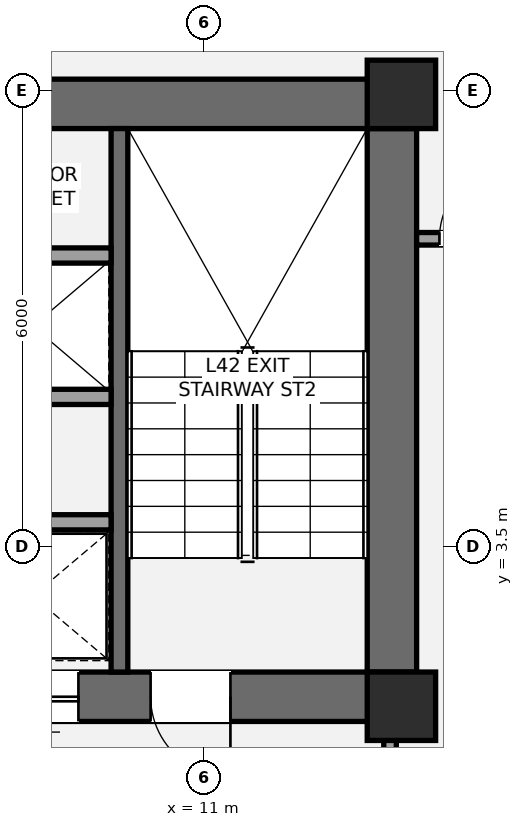
"""IFC4 building model, lengths in metres.
Left out: names, types, materials, properties, quantities, classifications, styles, units other than length and angle.
Written with IfcOpenShell. Run it as: python <this file> out.ifc"""

import sys

from ifc_helpers import new_model, si_unit, direction, frame, frame_2d, origin, origin_2d, place, context, subcontext, project, spatial, rectangle, extrude, element, fill, save


model = new_model("IFC4")
c1 = context("Model", 3, precision=1e-05, world=origin(), true_north=direction((0.0, 1.0)))
c2 = subcontext(c1, "Body", "Model", "MODEL_VIEW")
j1 = project(units=[si_unit("LENGTHUNIT", "METRE"), si_unit("PLANEANGLEUNIT", "RADIAN")], contexts=[c1])
p1 = place(None, origin())
s1 = spatial("IfcSite", under=j1, at=p1, CompositionType="ELEMENT")
p2 = place(p1, origin())
s2 = spatial("IfcBuilding", under=s1, at=p2, CompositionType="ELEMENT")
p3 = place(p2, frame((0.0, 0.0, 156.6)))
s3 = spatial("IfcBuildingStorey", under=s2, at=p3, CompositionType="ELEMENT", Elevation=156.6)
p4 = place(p3, frame((13.475, 1.2, 0.0), z_axis=(0.0, 0.0, 1.0), x_axis=(0.0, 1.0, 0.0)))
e1 = element("IfcWall", 1, at=p4, inside=s3, PredefinedType="SHEAR", context=c2, shape_type="SweptSolid", body=[
    extrude(rectangle(XDim=8.45, YDim=0.65, at=frame_2d((4.225, 0.0))), origin(), (0.0, 0.0, 1.0), 3.2),
])
p5 = place(p3, frame((4.475, 9.325, 0.0), z_axis=(0.0, 0.0, 1.0), x_axis=(1.0, 0.0, 0.0)))
e2 = element("IfcWall", 2, at=p5, inside=s3, PredefinedType="SHEAR", context=c2, shape_type="SweptSolid", body=[
    extrude(rectangle(XDim=9.325, YDim=0.65, at=frame_2d((4.663, 0.0))), origin(), (0.0, 0.0, 1.0), 3.2),
])
p6 = place(p3, frame((13.8, 1.525, 0.0), z_axis=(0.0, 0.0, 1.0), x_axis=(-1.0, 0.0, 0.0)))
e3 = element("IfcWall", 3, at=p6, inside=s3, PredefinedType="SHEAR", context=c2, shape_type="SweptSolid", body=[
    extrude(rectangle(XDim=8.925, YDim=0.65, at=frame_2d((4.462, 0.0))), origin(), (0.0, 0.0, 1.0), 3.2),
])
p7 = place(p6, frame((2.45, 0.0, 0.0)))
e4 = element("IfcOpeningElement", 4, at=p7, cuts=e3, PredefinedType="OPENING", context=c2, shape_type="SweptSolid", body=[
    extrude(rectangle(XDim=1.05, YDim=2.15, at=frame_2d((0.525, 1.075))), frame((0.0, 0.335, 0.0), z_axis=(0.0, -1.0, 0.0), x_axis=(1.0, 0.0, 0.0)), (0.0, 0.0, 1.0), 0.67),
])
p8 = place(p6, frame((4.45, 0.0, 0.0)))
e5 = element("IfcOpeningElement", 5, at=p8, cuts=e3, PredefinedType="OPENING", context=c2, shape_type="SweptSolid", body=[
    extrude(rectangle(XDim=1.1, YDim=2.2, at=frame_2d((0.55, 1.1))), frame((0.0, 0.335, 0.0), z_axis=(0.0, -1.0, 0.0), x_axis=(1.0, 0.0, 0.0)), (0.0, 0.0, 1.0), 0.67),
])
p9 = place(p3, frame((9.89, 1.85, 0.0), z_axis=(0.0, 0.0, 1.0), x_axis=(0.0, 1.0, 0.0)))
e6 = element("IfcWall", 6, at=p9, inside=s3, PredefinedType="SHEAR", context=c2, shape_type="SweptSolid", body=[
    extrude(rectangle(XDim=7.15, YDim=0.22, at=frame_2d((3.575, 0.0))), origin(), (0.0, 0.0, 1.0), 3.2),
])
for number, where, z_axis, x_axis in (
    (7, (13.6, 1.4, 0.0), (0.0, 0.0, 1.0), (1.0, 0.0, 0.0)),
    (8, (13.6, 9.45, 0.0), (0.0, 0.0, 1.0), (1.0, 0.0, 0.0)),
):
    element("IfcColumn", number, at=place(p3, frame(where, z_axis=z_axis, x_axis=x_axis)), inside=s3, PredefinedType="COLUMN", context=c2, shape_type="SweptSolid", body=[
        extrude(rectangle(XDim=0.9, YDim=0.9, at=origin_2d()), origin(), (0.0, 0.0, 1.0), 3.2),
    ])
p10 = place(p3, frame((13.45, -2.15, 0.0), z_axis=(0.0, 0.0, 1.0), x_axis=(0.0, 1.0, 0.0)))
e9 = element("IfcWall", 9, at=p10, inside=s3, PredefinedType="PARTITIONING", context=c2, shape_type="SweptSolid", body=[
    extrude(rectangle(XDim=3.4, YDim=0.165, at=frame_2d((1.7, 0.0))), origin(), (0.0, 0.0, 1.0), 3.02),
])
p11 = place(p10, frame((1.15, 0.0, 0.0)))
e10 = element("IfcOpeningElement", 10, at=p11, cuts=e9, PredefinedType="OPENING", context=c2, shape_type="SweptSolid", body=[
    extrude(rectangle(XDim=1.05, YDim=2.15, at=frame_2d((0.525, 1.075))), frame((0.0, 0.093, 0.0), z_axis=(0.0, -1.0, 0.0), x_axis=(1.0, 0.0, 0.0)), (0.0, 0.0, 1.0), 0.185),
])
p12 = place(p3, frame((5.525, 3.82, 0.0), z_axis=(0.0, 0.0, 1.0), x_axis=(1.0, 0.0, 0.0)))
e11 = element("IfcWall", 11, at=p12, inside=s3, PredefinedType="SOLIDWALL", context=c2, shape_type="SweptSolid", body=[
    extrude(rectangle(XDim=4.255, YDim=0.2, at=frame_2d((2.127, 0.0))), origin(), (0.0, 0.0, 1.0), 3.02),
])
p13 = place(p12, frame((0.65, 0.0, 0.0)))
e12 = element("IfcOpeningElement", 12, at=p13, cuts=e11, PredefinedType="OPENING", context=c2, shape_type="SweptSolid", body=[
    extrude(rectangle(XDim=1.2, YDim=2.2, at=frame_2d((0.6, 1.1))), frame((0.0, 0.11, 0.0), z_axis=(0.0, -1.0, 0.0), x_axis=(1.0, 0.0, 0.0)), (0.0, 0.0, 1.0), 0.22),
])
for number, where, z_axis, x_axis in (
    (13, (5.525, 5.47, 0.0), (0.0, 0.0, 1.0), (1.0, 0.0, 0.0)),
    (14, (5.525, 7.33, 0.0), (0.0, 0.0, 1.0), (1.0, 0.0, 0.0)),
):
    element("IfcWall", number, at=place(p3, frame(where, z_axis=z_axis, x_axis=x_axis)), inside=s3, PredefinedType="SOLIDWALL", context=c2, shape_type="SweptSolid", body=[
        extrude(rectangle(XDim=4.255, YDim=0.2, at=frame_2d((2.127, 0.0))), origin(), (0.0, 0.0, 1.0), 3.02),
    ])
p14 = place(p3, frame((13.8, 7.55, 0.0), z_axis=(0.0, 0.0, 1.0), x_axis=(1.0, 0.0, 0.0)))
e15 = element("IfcWall", 15, at=p14, inside=s3, PredefinedType="PARTITIONING", context=c2, shape_type="SweptSolid", body=[
    extrude(rectangle(XDim=1.75, YDim=0.165, at=frame_2d((0.875, 0.0))), origin(), (0.0, 0.0, 1.0), 2.473),
])
p15 = place(p14, frame((0.3, 0.0, 0.0)))
e16 = element("IfcOpeningElement", 16, at=p15, cuts=e15, PredefinedType="OPENING", context=c2, shape_type="SweptSolid", body=[
    extrude(rectangle(XDim=1.0, YDim=2.15, at=frame_2d((0.5, 1.075))), frame((0.0, 0.093, 0.0), z_axis=(0.0, -1.0, 0.0), x_axis=(1.0, 0.0, 0.0)), (0.0, 0.0, 1.0), 0.185),
])
p16 = place(p7, origin())
e17 = element("IfcDoor", 17, at=p16, inside=s3, OperationType="SINGLE_SWING_LEFT", PredefinedType="DOOR", context=c2, shape_type="SweptSolid", body=[
    extrude(rectangle(XDim=1.05, YDim=2.15, at=frame_2d((0.525, 1.075))), frame((0.0, 0.025, 0.0), z_axis=(0.0, -1.0, 0.0), x_axis=(1.0, 0.0, 0.0)), (0.0, 0.0, 1.0), 0.05),
])
fill(e4, e17)
p17 = place(p8, origin())
e18 = element("IfcDoor", 18, at=p17, inside=s3, OperationType="SLIDING_TO_LEFT", PredefinedType="DOOR", context=c2, shape_type="SweptSolid", body=[
    extrude(rectangle(XDim=1.1, YDim=2.2, at=frame_2d((0.55, 1.1))), frame((0.0, 0.025, 0.0), z_axis=(0.0, -1.0, 0.0), x_axis=(1.0, 0.0, 0.0)), (0.0, 0.0, 1.0), 0.05),
])
fill(e5, e18)
p18 = place(p15, origin())
e19 = element("IfcDoor", 19, at=p18, inside=s3, OperationType="SINGLE_SWING_RIGHT", PredefinedType="DOOR", context=c2, shape_type="SweptSolid", body=[
    extrude(rectangle(XDim=1.0, YDim=2.15, at=frame_2d((0.5, 1.075))), frame((0.0, 0.025, 0.0), z_axis=(0.0, -1.0, 0.0), x_axis=(1.0, 0.0, 0.0)), (0.0, 0.0, 1.0), 0.05),
])
fill(e16, e19)
save(model, sys.argv[1])
